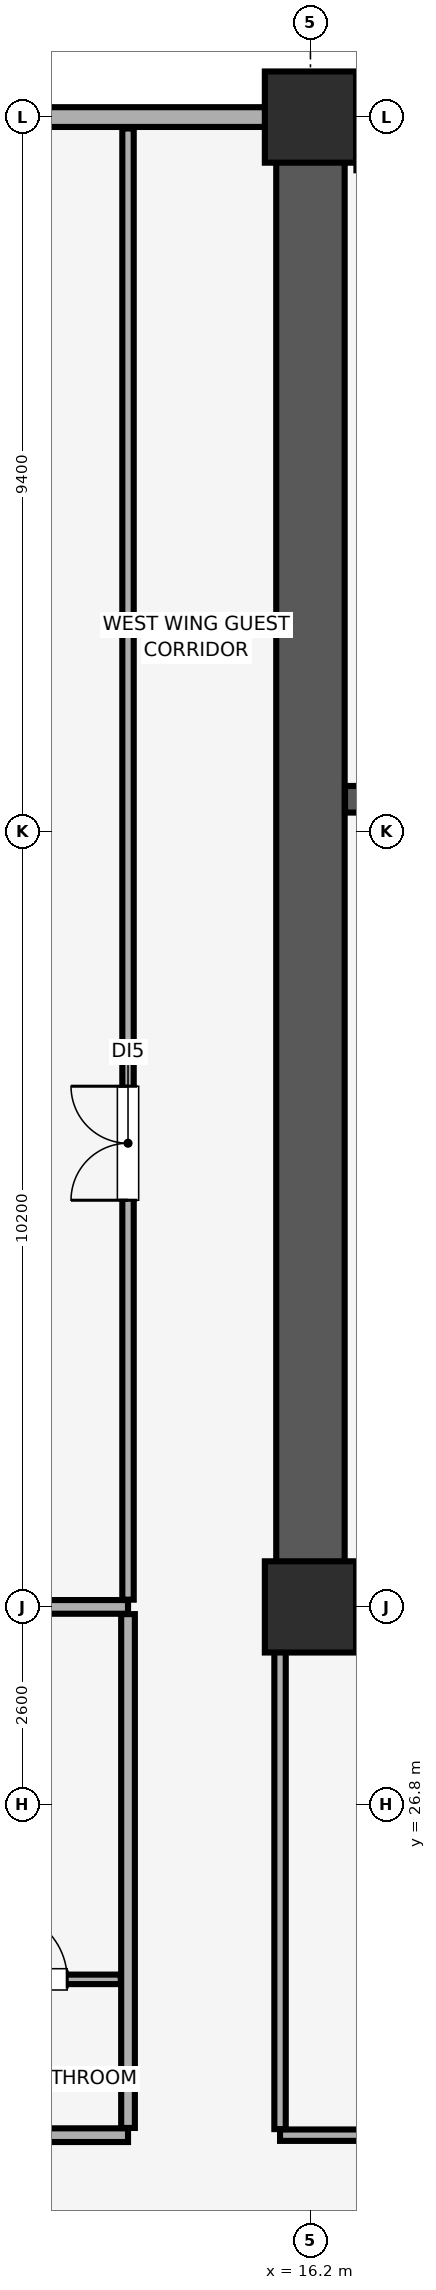
"""IFC4 building model, lengths in metres.
Left out: names, types, materials, properties, quantities, classifications, styles, units other than length and angle.
Written with IfcOpenShell. Run it as: python <this file> out.ifc"""

import sys

from ifc_helpers import new_model, si_unit, direction, frame, frame_2d, origin, origin_2d, place, context, subcontext, project, spatial, rectangle, extrude, element, fill, save


model = new_model("IFC4")
c1 = context("Model", 3, precision=1e-05, world=origin(), true_north=direction((0.0, 1.0)))
c2 = subcontext(c1, "Body", "Model", "MODEL_VIEW")
j1 = project(units=[si_unit("LENGTHUNIT", "METRE"), si_unit("PLANEANGLEUNIT", "RADIAN")], contexts=[c1])
p1 = place(None, origin())
s1 = spatial("IfcSite", under=j1, at=p1, CompositionType="ELEMENT")
p2 = place(p1, origin())
s2 = spatial("IfcBuilding", under=s1, at=p2, CompositionType="ELEMENT")
p3 = place(p2, frame((0.0, 0.0, 93.05)))
s3 = spatial("IfcBuildingStorey", under=s2, at=p3, CompositionType="ELEMENT", Elevation=93.05)
for number, where, z_axis, x_axis in (
    (1, (16.2, 29.4, 0.0), (0.0, 0.0, 1.0), (1.0, 0.0, 0.0)),
    (2, (16.2, 49.0, 0.0), (0.0, 0.0, 1.0), (1.0, 0.0, 0.0)),
):
    element("IfcColumn", number, at=place(p3, frame(where, z_axis=z_axis, x_axis=x_axis)), inside=s3, PredefinedType="COLUMN", context=c2, shape_type="SweptSolid", body=[
        extrude(rectangle(XDim=1.2, YDim=1.2, at=origin_2d()), origin(), (0.0, 0.0, 1.0), 3.51),
    ])
p4 = place(p3, frame((79.8, 49.0, 0.0), z_axis=(0.0, 0.0, 1.0), x_axis=(-1.0, 0.0, 0.0)))
e3 = element("IfcWall", 3, at=p4, inside=s3, PredefinedType="SOLIDWALL", context=c2, shape_type="SweptSolid", body=[
    extrude(rectangle(XDim=75.6, YDim=0.26, at=frame_2d((37.8, 0.0))), origin(), (0.0, 0.0, 1.0), 2.56),
])
p5 = place(p4, frame((72.565, 0.0, 0.85)))
e4 = element("IfcOpeningElement", 4, at=p5, cuts=e3, PredefinedType="OPENING", context=c2, shape_type="SweptSolid", body=[
    extrude(rectangle(XDim=1.5, YDim=1.4, at=frame_2d((0.75, 0.7))), frame((0.0, 0.14, 0.0), z_axis=(0.0, -1.0, 0.0), x_axis=(1.0, 0.0, 0.0)), (0.0, 0.0, 1.0), 0.28),
])
p6 = place(p4, frame((67.45, 0.0, 0.85)))
e5 = element("IfcOpeningElement", 5, at=p6, cuts=e3, PredefinedType="OPENING", context=c2, shape_type="SweptSolid", body=[
    extrude(rectangle(XDim=1.5, YDim=1.4, at=frame_2d((0.75, 0.7))), frame((0.0, 0.14, 0.0), z_axis=(0.0, -1.0, 0.0), x_axis=(1.0, 0.0, 0.0)), (0.0, 0.0, 1.0), 0.28),
])
p7 = place(p4, frame((7.6, 0.0, 0.85)))
e6 = element("IfcOpeningElement", 6, at=p7, cuts=e3, PredefinedType="OPENING", context=c2, shape_type="SweptSolid", body=[
    extrude(rectangle(XDim=1.5, YDim=1.4, at=frame_2d((0.75, 0.7))), frame((0.0, 0.14, 0.0), z_axis=(0.0, -1.0, 0.0), x_axis=(1.0, 0.0, 0.0)), (0.0, 0.0, 1.0), 0.28),
])
p8 = place(p4, frame((1.535, 0.0, 0.85)))
e7 = element("IfcOpeningElement", 7, at=p8, cuts=e3, PredefinedType="OPENING", context=c2, shape_type="SweptSolid", body=[
    extrude(rectangle(XDim=1.5, YDim=1.4, at=frame_2d((0.75, 0.7))), frame((0.0, 0.14, 0.0), z_axis=(0.0, -1.0, 0.0), x_axis=(1.0, 0.0, 0.0)), (0.0, 0.0, 1.0), 0.28),
])
p9 = place(p4, frame((52.265, 0.0, 0.9)))
e8 = element("IfcOpeningElement", 8, at=p9, cuts=e3, PredefinedType="OPENING", context=c2, shape_type="SweptSolid", body=[
    extrude(rectangle(XDim=1.5, YDim=1.4, at=frame_2d((0.75, 0.7))), frame((0.0, 0.14, 0.0), z_axis=(0.0, -1.0, 0.0), x_axis=(1.0, 0.0, 0.0)), (0.0, 0.0, 1.0), 0.28),
])
p10 = place(p4, frame((45.5, 0.0, 0.9)))
e9 = element("IfcOpeningElement", 9, at=p10, cuts=e3, PredefinedType="OPENING", context=c2, shape_type="SweptSolid", body=[
    extrude(rectangle(XDim=1.5, YDim=1.4, at=frame_2d((0.75, 0.7))), frame((0.0, 0.14, 0.0), z_axis=(0.0, -1.0, 0.0), x_axis=(1.0, 0.0, 0.0)), (0.0, 0.0, 1.0), 0.28),
])
p11 = place(p4, frame((31.05, 0.0, 0.9)))
e10 = element("IfcOpeningElement", 10, at=p11, cuts=e3, PredefinedType="OPENING", context=c2, shape_type="SweptSolid", body=[
    extrude(rectangle(XDim=1.5, YDim=1.4, at=frame_2d((0.75, 0.7))), frame((0.0, 0.14, 0.0), z_axis=(0.0, -1.0, 0.0), x_axis=(1.0, 0.0, 0.0)), (0.0, 0.0, 1.0), 0.28),
])
p12 = place(p4, frame((27.85, 0.0, 0.9)))
e11 = element("IfcOpeningElement", 11, at=p12, cuts=e3, PredefinedType="OPENING", context=c2, shape_type="SweptSolid", body=[
    extrude(rectangle(XDim=1.5, YDim=1.4, at=frame_2d((0.75, 0.7))), frame((0.0, 0.14, 0.0), z_axis=(0.0, -1.0, 0.0), x_axis=(1.0, 0.0, 0.0)), (0.0, 0.0, 1.0), 0.28),
])
p13 = place(p4, frame((23.485, 0.0, 0.9)))
e12 = element("IfcOpeningElement", 12, at=p13, cuts=e3, PredefinedType="OPENING", context=c2, shape_type="SweptSolid", body=[
    extrude(rectangle(XDim=1.5, YDim=1.4, at=frame_2d((0.75, 0.7))), frame((0.0, 0.14, 0.0), z_axis=(0.0, -1.0, 0.0), x_axis=(1.0, 0.0, 0.0)), (0.0, 0.0, 1.0), 0.28),
])
p14 = place(p3, frame((16.2, 29.4, 0.0), z_axis=(0.0, 0.0, 1.0), x_axis=(0.0, 1.0, 0.0)))
e13 = element("IfcWall", 13, at=p14, inside=s3, PredefinedType="SHEAR", context=c2, shape_type="SweptSolid", body=[
    extrude(rectangle(XDim=19.2, YDim=0.9, at=frame_2d((9.6, 0.0))), origin(), (0.0, 0.0, 1.0), 3.51),
])
p15 = place(p3, frame((16.655, 29.4, 0.0), z_axis=(0.0, 0.0, 1.0), x_axis=(1.0, 0.0, 0.0)))
e14 = element("IfcWall", 14, at=p15, inside=s3, PredefinedType="SHEAR", context=c2, shape_type="SweptSolid", body=[
    extrude(rectangle(XDim=6.945, YDim=0.9, at=frame_2d((3.473, 0.0))), origin(), (0.0, 0.0, 1.0), 3.51),
])
p16 = place(p3, frame((16.655, 40.025, 0.0), z_axis=(0.0, 0.0, 1.0), x_axis=(1.0, 0.0, 0.0)))
e15 = element("IfcWall", 15, at=p16, inside=s3, PredefinedType="SHEAR", context=c2, shape_type="SweptSolid", body=[
    extrude(rectangle(XDim=4.2, YDim=0.35, at=frame_2d((2.1, 0.0))), origin(), (0.0, 0.0, 1.0), 3.51),
])
p17 = place(p16, frame((1.81, 0.0, 0.0)))
e16 = element("IfcOpeningElement", 16, at=p17, cuts=e15, PredefinedType="OPENING", context=c2, shape_type="SweptSolid", body=[
    extrude(rectangle(XDim=1.15, YDim=2.15, at=frame_2d((0.575, 1.075))), frame((0.0, 0.185, 0.0), z_axis=(0.0, -1.0, 0.0), x_axis=(1.0, 0.0, 0.0)), (0.0, 0.0, 1.0), 0.37),
])
p18 = place(p3, frame((15.8, 22.45, 0.0), z_axis=(0.0, 0.0, 1.0), x_axis=(1.0, 0.0, 0.0)))
e17 = element("IfcWall", 17, at=p18, inside=s3, PredefinedType="PARTITIONING", context=c2, shape_type="SweptSolid", body=[
    extrude(rectangle(XDim=9.2, YDim=0.15, at=frame_2d((4.6, 0.0))), origin(), (0.0, 0.0, 1.0), 3.51),
])
p19 = place(p18, frame((4.1, 0.0, 0.0)))
e18 = element("IfcOpeningElement", 18, at=p19, cuts=e17, PredefinedType="OPENING", context=c2, shape_type="SweptSolid", body=[
    extrude(rectangle(XDim=1.0, YDim=2.15, at=frame_2d((0.5, 1.075))), frame((0.0, 0.085, 0.0), z_axis=(0.0, -1.0, 0.0), x_axis=(1.0, 0.0, 0.0)), (0.0, 0.0, 1.0), 0.17),
])
p20 = place(p3, frame((15.8, 22.53, 0.0), z_axis=(0.0, 0.0, 1.0), x_axis=(0.0, 1.0, 0.0)))
e19 = element("IfcWall", 19, at=p20, inside=s3, PredefinedType="PARTITIONING", context=c2, shape_type="SweptSolid", body=[
    extrude(rectangle(XDim=6.86, YDim=0.15, at=frame_2d((3.43, 0.0))), origin(), (0.0, 0.0, 1.0), 3.51),
])
p21 = place(p3, frame((0.15, 22.45, 0.0), z_axis=(0.0, 0.0, 1.0), x_axis=(1.0, 0.0, 0.0)))
e20 = element("IfcWall", 20, at=p21, inside=s3, PredefinedType="PARTITIONING", context=c2, shape_type="SweptSolid", body=[
    extrude(rectangle(XDim=13.65, YDim=0.18, at=frame_2d((6.825, 0.0))), origin(), (0.0, 0.0, 1.0), 3.51),
])
p22 = place(p21, frame((5.685, 0.0, 0.0)))
e21 = element("IfcOpeningElement", 21, at=p22, cuts=e20, PredefinedType="OPENING", context=c2, shape_type="SweptSolid", body=[
    extrude(rectangle(XDim=1.0, YDim=2.15, at=frame_2d((0.5, 1.075))), frame((0.0, 0.1, 0.0), z_axis=(0.0, -1.0, 0.0), x_axis=(1.0, 0.0, 0.0)), (0.0, 0.0, 1.0), 0.2),
])
p23 = place(p3, frame((0.15, 29.4, 0.0), z_axis=(0.0, 0.0, 1.0), x_axis=(1.0, 0.0, 0.0)))
e22 = element("IfcWall", 22, at=p23, inside=s3, PredefinedType="PARTITIONING", context=c2, shape_type="SweptSolid", body=[
    extrude(rectangle(XDim=13.65, YDim=0.18, at=frame_2d((6.825, 0.0))), origin(), (0.0, 0.0, 1.0), 2.86),
])
p24 = place(p3, frame((13.8, 22.545, 0.0), z_axis=(0.0, 0.0, 1.0), x_axis=(0.0, 1.0, 0.0)))
e23 = element("IfcWall", 23, at=p24, inside=s3, PredefinedType="PARTITIONING", context=c2, shape_type="SweptSolid", body=[
    extrude(rectangle(XDim=6.76, YDim=0.18, at=frame_2d((3.38, 0.0))), origin(), (0.0, 0.0, 1.0), 3.51),
])
p25 = place(p3, frame((11.3, 24.5, 0.0), z_axis=(0.0, 0.0, 1.0), x_axis=(1.0, 0.0, 0.0)))
e24 = element("IfcWall", 24, at=p25, inside=s3, PredefinedType="PARTITIONING", context=c2, shape_type="SweptSolid", body=[
    extrude(rectangle(XDim=2.405, YDim=0.125, at=frame_2d((1.203, 0.0))), origin(), (0.0, 0.0, 1.0), 3.51),
])
p26 = place(p25, frame((0.8, 0.0, 0.0)))
e25 = element("IfcOpeningElement", 25, at=p26, cuts=e24, PredefinedType="OPENING", context=c2, shape_type="SweptSolid", body=[
    extrude(rectangle(XDim=0.9, YDim=2.1, at=frame_2d((0.45, 1.05))), frame((0.0, 0.073, 0.0), z_axis=(0.0, -1.0, 0.0), x_axis=(1.0, 0.0, 0.0)), (0.0, 0.0, 1.0), 0.145),
])
p27 = place(p3, frame((13.8, 29.495, 0.0), z_axis=(0.0, 0.0, 1.0), x_axis=(0.0, 1.0, 0.0)))
e26 = element("IfcWall", 26, at=p27, inside=s3, PredefinedType="PARTITIONING", context=c2, shape_type="SweptSolid", body=[
    extrude(rectangle(XDim=19.355, YDim=0.15, at=frame_2d((9.677, 0.0))), origin(), (0.0, 0.0, 1.0), 3.51),
])
p28 = place(p27, frame((5.255, 0.0, 0.0)))
e27 = element("IfcOpeningElement", 27, at=p28, cuts=e26, PredefinedType="OPENING", context=c2, shape_type="SweptSolid", body=[
    extrude(rectangle(XDim=1.5, YDim=2.25, at=frame_2d((0.75, 1.125))), frame((0.0, 0.085, 0.0), z_axis=(0.0, -1.0, 0.0), x_axis=(1.0, 0.0, 0.0)), (0.0, 0.0, 1.0), 0.17),
])
p29 = place(p26, origin())
e28 = element("IfcDoor", 28, at=p29, inside=s3, OperationType="SINGLE_SWING_LEFT", PredefinedType="DOOR", context=c2, shape_type="SweptSolid", body=[
    extrude(rectangle(XDim=0.9, YDim=2.1, at=frame_2d((0.45, 1.05))), frame((0.0, 0.025, 0.0), z_axis=(0.0, -1.0, 0.0), x_axis=(1.0, 0.0, 0.0)), (0.0, 0.0, 1.0), 0.05),
])
fill(e25, e28)
p30 = place(p28, origin())
e29 = element("IfcDoor", 29, at=p30, inside=s3, OperationType="DOUBLE_DOOR_SINGLE_SWING", PredefinedType="DOOR", context=c2, shape_type="SweptSolid", body=[
    extrude(rectangle(XDim=1.5, YDim=2.25, at=frame_2d((0.75, 1.125))), frame((0.0, 0.025, 0.0), z_axis=(0.0, -1.0, 0.0), x_axis=(1.0, 0.0, 0.0)), (0.0, 0.0, 1.0), 0.05),
])
fill(e27, e29)
save(model, sys.argv[1])
